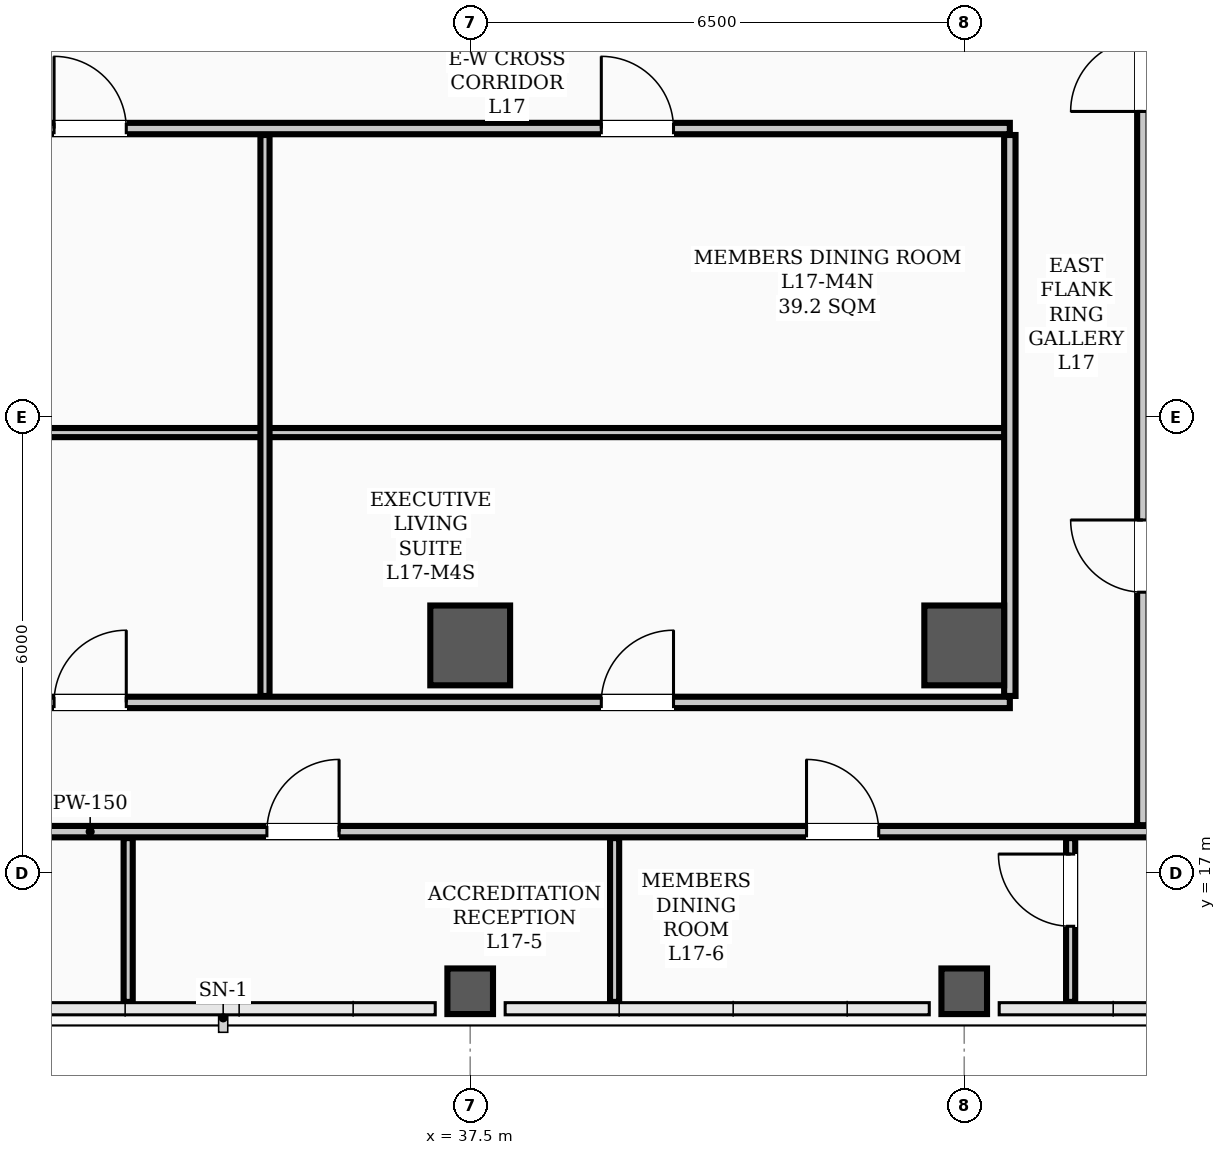
"""IFC4 building model, lengths in metres.
Left out: names, types, materials, properties, quantities, classifications, styles, units other than length and angle.
Written with IfcOpenShell. Run it as: python <this file> out.ifc"""

import sys

from ifc_helpers import new_model, si_unit, direction, frame, frame_2d, origin, origin_2d, place, context, subcontext, project, spatial, rectangle, hollow_rectangle, extrude, element, fill, save


model = new_model("IFC4")
c1 = context("Model", 3, precision=1e-05, world=origin(), true_north=direction((0.0, 1.0)))
c2 = subcontext(c1, "Body", "Model", "MODEL_VIEW")
j1 = project(units=[si_unit("LENGTHUNIT", "METRE"), si_unit("PLANEANGLEUNIT", "RADIAN")], contexts=[c1])
p1 = place(None, origin())
s1 = spatial("IfcSite", under=j1, at=p1, CompositionType="ELEMENT")
p2 = place(p1, origin())
s2 = spatial("IfcBuilding", under=s1, at=p2, CompositionType="ELEMENT")
p3 = place(p2, frame((0.0, 0.0, 69.4)))
s3 = spatial("IfcBuildingStorey", under=s2, at=p3, CompositionType="ELEMENT", Elevation=69.4)
for number, where, z_axis, x_axis in (
    (1, (37.5, 20.0, 0.0), (0.0, 0.0, 1.0), (1.0, 0.0, 0.0)),
    (2, (44.0, 20.0, 0.0), (0.0, 0.0, 1.0), (1.0, 0.0, 0.0)),
):
    element("IfcColumn", number, at=place(p3, frame(where, z_axis=z_axis, x_axis=x_axis)), inside=s3, PredefinedType="COLUMN", context=c2, shape_type="SweptSolid", body=[
        extrude(hollow_rectangle(XDim=1.05, YDim=1.05, WallThickness=0.038, InnerFilletRadius=0.019, OuterFilletRadius=0.057, at=origin_2d()), origin(), (0.0, 0.0, 1.0), 3.9),
    ])
for number, where, z_axis, x_axis in (
    (3, (37.5, 15.45, 0.0), (0.0, 0.0, 1.0), (1.0, 0.0, 0.0)),
    (4, (44.0, 15.45, 0.0), (0.0, 0.0, 1.0), (1.0, 0.0, 0.0)),
):
    element("IfcColumn", number, at=place(p3, frame(where, z_axis=z_axis, x_axis=x_axis)), inside=s3, PredefinedType="COLUMN", context=c2, shape_type="SweptSolid", body=[
        extrude(hollow_rectangle(XDim=0.6, YDim=0.6, WallThickness=0.026, InnerFilletRadius=0.013, OuterFilletRadius=0.039, at=origin_2d()), origin(), (0.0, 0.0, 1.0), 3.9),
    ])
p4 = place(p3, frame((12.9, 26.8, 0.0), z_axis=(0.0, 0.0, 1.0), x_axis=(1.0, 0.0, 0.0)))
e5 = element("IfcWall", 5, at=p4, inside=s3, PredefinedType="PARTITIONING", context=c2, shape_type="SweptSolid", body=[
    extrude(rectangle(XDim=31.7, YDim=0.15, at=frame_2d((15.85, 0.0))), origin(), (0.0, 0.0, 1.0), 3.1),
])
p5 = place(p4, frame((13.6, 0.0, 0.0)))
e6 = element("IfcOpeningElement", 6, at=p5, cuts=e5, PredefinedType="OPENING", context=c2, shape_type="SweptSolid", body=[
    extrude(rectangle(XDim=1.6, YDim=2.08, at=frame_2d((0.8, 1.04))), frame((0.0, 0.085, 0.0), z_axis=(0.0, -1.0, 0.0), x_axis=(1.0, 0.0, 0.0)), (0.0, 0.0, 1.0), 0.17),
])
p6 = place(p4, frame((2.475, 0.0, 0.0)))
e7 = element("IfcOpeningElement", 7, at=p6, cuts=e5, PredefinedType="OPENING", context=c2, shape_type="SweptSolid", body=[
    extrude(rectangle(XDim=0.95, YDim=2.08, at=frame_2d((0.475, 1.04))), frame((0.0, 0.085, 0.0), z_axis=(0.0, -1.0, 0.0), x_axis=(1.0, 0.0, 0.0)), (0.0, 0.0, 1.0), 0.17),
])
p7 = place(p4, frame((9.125, 0.0, 0.0)))
e8 = element("IfcOpeningElement", 8, at=p7, cuts=e5, PredefinedType="OPENING", context=c2, shape_type="SweptSolid", body=[
    extrude(rectangle(XDim=0.95, YDim=2.08, at=frame_2d((0.475, 1.04))), frame((0.0, 0.085, 0.0), z_axis=(0.0, -1.0, 0.0), x_axis=(1.0, 0.0, 0.0)), (0.0, 0.0, 1.0), 0.17),
])
p8 = place(p4, frame((19.125, 0.0, 0.0)))
e9 = element("IfcOpeningElement", 9, at=p8, cuts=e5, PredefinedType="OPENING", context=c2, shape_type="SweptSolid", body=[
    extrude(rectangle(XDim=0.95, YDim=2.08, at=frame_2d((0.475, 1.04))), frame((0.0, 0.085, 0.0), z_axis=(0.0, -1.0, 0.0), x_axis=(1.0, 0.0, 0.0)), (0.0, 0.0, 1.0), 0.17),
])
p9 = place(p4, frame((26.325, 0.0, 0.0)))
e10 = element("IfcOpeningElement", 10, at=p9, cuts=e5, PredefinedType="OPENING", context=c2, shape_type="SweptSolid", body=[
    extrude(rectangle(XDim=0.95, YDim=2.08, at=frame_2d((0.475, 1.04))), frame((0.0, 0.085, 0.0), z_axis=(0.0, -1.0, 0.0), x_axis=(1.0, 0.0, 0.0)), (0.0, 0.0, 1.0), 0.17),
])
p10 = place(p3, frame((10.16, 17.55, 0.0), z_axis=(0.0, 0.0, 1.0), x_axis=(1.0, 0.0, 0.0)))
e11 = element("IfcWall", 11, at=p10, inside=s3, PredefinedType="PARTITIONING", context=c2, shape_type="SweptSolid", body=[
    extrude(rectangle(XDim=44.68, YDim=0.15, at=frame_2d((22.34, 0.0))), origin(), (0.0, 0.0, 1.0), 3.1),
])
p11 = place(p10, frame((2.04, 0.0, 0.0)))
e12 = element("IfcOpeningElement", 12, at=p11, cuts=e11, PredefinedType="OPENING", context=c2, shape_type="SweptSolid", body=[
    extrude(rectangle(XDim=0.95, YDim=2.08, at=frame_2d((0.475, 1.04))), frame((0.0, 0.085, 0.0), z_axis=(0.0, -1.0, 0.0), x_axis=(1.0, 0.0, 0.0)), (0.0, 0.0, 1.0), 0.17),
])
p12 = place(p10, frame((6.565, 0.0, 0.0)))
e13 = element("IfcOpeningElement", 13, at=p12, cuts=e11, PredefinedType="OPENING", context=c2, shape_type="SweptSolid", body=[
    extrude(rectangle(XDim=0.95, YDim=2.08, at=frame_2d((0.475, 1.04))), frame((0.0, 0.085, 0.0), z_axis=(0.0, -1.0, 0.0), x_axis=(1.0, 0.0, 0.0)), (0.0, 0.0, 1.0), 0.17),
])
p13 = place(p10, frame((11.865, 0.0, 0.0)))
e14 = element("IfcOpeningElement", 14, at=p13, cuts=e11, PredefinedType="OPENING", context=c2, shape_type="SweptSolid", body=[
    extrude(rectangle(XDim=0.95, YDim=2.08, at=frame_2d((0.475, 1.04))), frame((0.0, 0.085, 0.0), z_axis=(0.0, -1.0, 0.0), x_axis=(1.0, 0.0, 0.0)), (0.0, 0.0, 1.0), 0.17),
])
p14 = place(p10, frame((24.665, 0.0, 0.0)))
e15 = element("IfcOpeningElement", 15, at=p14, cuts=e11, PredefinedType="OPENING", context=c2, shape_type="SweptSolid", body=[
    extrude(rectangle(XDim=0.95, YDim=2.08, at=frame_2d((0.475, 1.04))), frame((0.0, 0.085, 0.0), z_axis=(0.0, -1.0, 0.0), x_axis=(1.0, 0.0, 0.0)), (0.0, 0.0, 1.0), 0.17),
])
p15 = place(p10, frame((31.765, 0.0, 0.0)))
e16 = element("IfcOpeningElement", 16, at=p15, cuts=e11, PredefinedType="OPENING", context=c2, shape_type="SweptSolid", body=[
    extrude(rectangle(XDim=0.95, YDim=2.08, at=frame_2d((0.475, 1.04))), frame((0.0, 0.085, 0.0), z_axis=(0.0, -1.0, 0.0), x_axis=(1.0, 0.0, 0.0)), (0.0, 0.0, 1.0), 0.17),
])
p16 = place(p3, frame((28.4, 19.25, 0.0), z_axis=(0.0, 0.0, 1.0), x_axis=(1.0, 0.0, 0.0)))
e17 = element("IfcWall", 17, at=p16, inside=s3, PredefinedType="PARTITIONING", context=c2, shape_type="SweptSolid", body=[
    extrude(rectangle(XDim=16.2, YDim=0.15, at=frame_2d((8.1, 0.0))), origin(), (0.0, 0.0, 1.0), 3.1),
])
p17 = place(p16, frame((3.625, 0.0, 0.0)))
e18 = element("IfcOpeningElement", 18, at=p17, cuts=e17, PredefinedType="OPENING", context=c2, shape_type="SweptSolid", body=[
    extrude(rectangle(XDim=0.95, YDim=2.08, at=frame_2d((0.475, 1.04))), frame((0.0, 0.085, 0.0), z_axis=(0.0, -1.0, 0.0), x_axis=(1.0, 0.0, 0.0)), (0.0, 0.0, 1.0), 0.17),
])
p18 = place(p16, frame((10.825, 0.0, 0.0)))
e19 = element("IfcOpeningElement", 19, at=p18, cuts=e17, PredefinedType="OPENING", context=c2, shape_type="SweptSolid", body=[
    extrude(rectangle(XDim=0.95, YDim=2.08, at=frame_2d((0.475, 1.04))), frame((0.0, 0.085, 0.0), z_axis=(0.0, -1.0, 0.0), x_axis=(1.0, 0.0, 0.0)), (0.0, 0.0, 1.0), 0.17),
])
p19 = place(p3, frame((28.4, 22.8, 0.0), z_axis=(0.0, 0.0, 1.0), x_axis=(1.0, 0.0, 0.0)))
e20 = element("IfcWall", 20, at=p19, inside=s3, PredefinedType="PARTITIONING", context=c2, shape_type="SweptSolid", body=[
    extrude(rectangle(XDim=6.4, YDim=0.12, at=frame_2d((3.2, 0.0))), origin(), (0.0, 0.0, 1.0), 3.1),
])
p20 = place(p3, frame((34.8, 22.8, 0.0), z_axis=(0.0, 0.0, 1.0), x_axis=(1.0, 0.0, 0.0)))
e21 = element("IfcWall", 21, at=p20, inside=s3, PredefinedType="PARTITIONING", context=c2, shape_type="SweptSolid", body=[
    extrude(rectangle(XDim=9.8, YDim=0.12, at=frame_2d((4.9, 0.0))), origin(), (0.0, 0.0, 1.0), 3.1),
])
p21 = place(p3, frame((46.35, 24.8, 0.0), z_axis=(0.0, 0.0, 1.0), x_axis=(1.0, 0.0, 0.0)))
e22 = element("IfcWall", 22, at=p21, inside=s3, PredefinedType="PARTITIONING", context=c2, shape_type="SweptSolid", body=[
    extrude(rectangle(XDim=10.84, YDim=0.12, at=frame_2d((5.42, 0.0))), origin(), (0.0, 0.0, 1.0), 3.212),
])
p22 = place(p3, frame((46.35, 17.635, 0.0), z_axis=(0.0, 0.0, 1.0), x_axis=(0.0, 1.0, 0.0)))
e23 = element("IfcWall", 23, at=p22, inside=s3, PredefinedType="PARTITIONING", context=c2, shape_type="SweptSolid", body=[
    extrude(rectangle(XDim=22.53, YDim=0.15, at=frame_2d((11.265, 0.0))), origin(), (0.0, 0.0, 1.0), 3.0),
])
p23 = place(p22, frame((3.065, 0.0, 0.0)))
e24 = element("IfcOpeningElement", 24, at=p23, cuts=e23, PredefinedType="OPENING", context=c2, shape_type="SweptSolid", body=[
    extrude(rectangle(XDim=0.95, YDim=2.08, at=frame_2d((0.475, 1.04))), frame((0.0, 0.085, 0.0), z_axis=(0.0, -1.0, 0.0), x_axis=(1.0, 0.0, 0.0)), (0.0, 0.0, 1.0), 0.17),
])
p24 = place(p22, frame((9.39, 0.0, 0.0)))
e25 = element("IfcOpeningElement", 25, at=p24, cuts=e23, PredefinedType="OPENING", context=c2, shape_type="SweptSolid", body=[
    extrude(rectangle(XDim=0.95, YDim=2.08, at=frame_2d((0.475, 1.04))), frame((0.0, 0.085, 0.0), z_axis=(0.0, -1.0, 0.0), x_axis=(1.0, 0.0, 0.0)), (0.0, 0.0, 1.0), 0.17),
])
p25 = place(p22, frame((14.69, 0.0, 0.0)))
e26 = element("IfcOpeningElement", 26, at=p25, cuts=e23, PredefinedType="OPENING", context=c2, shape_type="SweptSolid", body=[
    extrude(rectangle(XDim=0.95, YDim=2.08, at=frame_2d((0.475, 1.04))), frame((0.0, 0.085, 0.0), z_axis=(0.0, -1.0, 0.0), x_axis=(1.0, 0.0, 0.0)), (0.0, 0.0, 1.0), 0.17),
])
p26 = place(p22, frame((19.715, 0.0, 0.0)))
e27 = element("IfcOpeningElement", 27, at=p26, cuts=e23, PredefinedType="OPENING", context=c2, shape_type="SweptSolid", body=[
    extrude(rectangle(XDim=0.95, YDim=2.08, at=frame_2d((0.475, 1.04))), frame((0.0, 0.085, 0.0), z_axis=(0.0, -1.0, 0.0), x_axis=(1.0, 0.0, 0.0)), (0.0, 0.0, 1.0), 0.17),
])
p27 = place(p3, frame((44.6, 19.335, 0.0), z_axis=(0.0, 0.0, 1.0), x_axis=(0.0, 1.0, 0.0)))
e28 = element("IfcWall", 28, at=p27, inside=s3, PredefinedType="PARTITIONING", context=c2, shape_type="SweptSolid", body=[
    extrude(rectangle(XDim=7.38, YDim=0.15, at=frame_2d((3.69, 0.0))), origin(), (0.0, 0.0, 1.0), 3.0),
])
for number, where, z_axis, x_axis in (
    (29, (33.0, 15.31, 0.0), (0.0, 0.0, 1.0), (0.0, 1.0, 0.0)),
    (30, (39.4, 15.31, 0.0), (0.0, 0.0, 1.0), (0.0, 1.0, 0.0)),
):
    element("IfcWall", number, at=place(p3, frame(where, z_axis=z_axis, x_axis=x_axis)), inside=s3, PredefinedType="PARTITIONING", context=c2, shape_type="SweptSolid", body=[
        extrude(rectangle(XDim=2.155, YDim=0.12, at=frame_2d((1.078, 0.0))), origin(), (0.0, 0.0, 1.0), 3.212),
    ])
p28 = place(p3, frame((45.4, 15.31, 0.0), z_axis=(0.0, 0.0, 1.0), x_axis=(0.0, 1.0, 0.0)))
e31 = element("IfcWall", 31, at=p28, inside=s3, PredefinedType="PARTITIONING", context=c2, shape_type="SweptSolid", body=[
    extrude(rectangle(XDim=2.155, YDim=0.12, at=frame_2d((1.078, 0.0))), origin(), (0.0, 0.0, 1.0), 3.72),
])
p29 = place(p28, frame((0.995, 0.0, 0.0)))
e32 = element("IfcOpeningElement", 32, at=p29, cuts=e31, PredefinedType="OPENING", context=c2, shape_type="SweptSolid", body=[
    extrude(rectangle(XDim=0.95, YDim=2.08, at=frame_2d((0.475, 1.04))), frame((0.0, 0.07, 0.0), z_axis=(0.0, -1.0, 0.0), x_axis=(1.0, 0.0, 0.0)), (0.0, 0.0, 1.0), 0.14),
])
p30 = place(p3, frame((34.8, 19.335, 0.0), z_axis=(0.0, 0.0, 1.0), x_axis=(0.0, 1.0, 0.0)))
e33 = element("IfcWall", 33, at=p30, inside=s3, PredefinedType="PARTITIONING", context=c2, shape_type="SweptSolid", body=[
    extrude(rectangle(XDim=7.38, YDim=0.12, at=frame_2d((3.69, 0.0))), origin(), (0.0, 0.0, 1.0), 3.0),
])
p31 = place(p14, origin())
e34 = element("IfcDoor", 34, at=p31, inside=s3, OperationType="SINGLE_SWING_RIGHT", PredefinedType="DOOR", context=c2, shape_type="SweptSolid", body=[
    extrude(rectangle(XDim=0.95, YDim=2.08, at=frame_2d((0.475, 1.04))), frame((0.0, 0.025, 0.0), z_axis=(0.0, -1.0, 0.0), x_axis=(1.0, 0.0, 0.0)), (0.0, 0.0, 1.0), 0.05),
])
fill(e15, e34)
p32 = place(p15, origin())
e35 = element("IfcDoor", 35, at=p32, inside=s3, OperationType="SINGLE_SWING_LEFT", PredefinedType="DOOR", context=c2, shape_type="SweptSolid", body=[
    extrude(rectangle(XDim=0.95, YDim=2.08, at=frame_2d((0.475, 1.04))), frame((0.0, 0.025, 0.0), z_axis=(0.0, -1.0, 0.0), x_axis=(1.0, 0.0, 0.0)), (0.0, 0.0, 1.0), 0.05),
])
fill(e16, e35)
p33 = place(p29, origin())
e36 = element("IfcDoor", 36, at=p33, inside=s3, OperationType="SINGLE_SWING_RIGHT", PredefinedType="DOOR", context=c2, shape_type="SweptSolid", body=[
    extrude(rectangle(XDim=0.95, YDim=2.08, at=frame_2d((0.475, 1.04))), frame((0.0, 0.025, 0.0), z_axis=(0.0, -1.0, 0.0), x_axis=(1.0, 0.0, 0.0)), (0.0, 0.0, 1.0), 0.05),
])
fill(e32, e36)
p34 = place(p8, origin())
e37 = element("IfcDoor", 37, at=p34, inside=s3, OperationType="SINGLE_SWING_LEFT", PredefinedType="DOOR", context=c2, shape_type="SweptSolid", body=[
    extrude(rectangle(XDim=0.95, YDim=2.08, at=frame_2d((0.475, 1.04))), frame((0.0, 0.025, 0.0), z_axis=(0.0, -1.0, 0.0), x_axis=(1.0, 0.0, 0.0)), (0.0, 0.0, 1.0), 0.05),
])
fill(e9, e37)
p35 = place(p17, origin())
e38 = element("IfcDoor", 38, at=p35, inside=s3, OperationType="SINGLE_SWING_RIGHT", PredefinedType="DOOR", context=c2, shape_type="SweptSolid", body=[
    extrude(rectangle(XDim=0.95, YDim=2.08, at=frame_2d((0.475, 1.04))), frame((0.0, 0.025, 0.0), z_axis=(0.0, -1.0, 0.0), x_axis=(1.0, 0.0, 0.0)), (0.0, 0.0, 1.0), 0.05),
])
fill(e18, e38)
p36 = place(p9, origin())
e39 = element("IfcDoor", 39, at=p36, inside=s3, OperationType="SINGLE_SWING_LEFT", PredefinedType="DOOR", context=c2, shape_type="SweptSolid", body=[
    extrude(rectangle(XDim=0.95, YDim=2.08, at=frame_2d((0.475, 1.04))), frame((0.0, 0.025, 0.0), z_axis=(0.0, -1.0, 0.0), x_axis=(1.0, 0.0, 0.0)), (0.0, 0.0, 1.0), 0.05),
])
fill(e10, e39)
p37 = place(p18, origin())
e40 = element("IfcDoor", 40, at=p37, inside=s3, OperationType="SINGLE_SWING_RIGHT", PredefinedType="DOOR", context=c2, shape_type="SweptSolid", body=[
    extrude(rectangle(XDim=0.95, YDim=2.08, at=frame_2d((0.475, 1.04))), frame((0.0, 0.025, 0.0), z_axis=(0.0, -1.0, 0.0), x_axis=(1.0, 0.0, 0.0)), (0.0, 0.0, 1.0), 0.05),
])
fill(e19, e40)
p38 = place(p23, origin())
e41 = element("IfcDoor", 41, at=p38, inside=s3, OperationType="SINGLE_SWING_RIGHT", PredefinedType="DOOR", context=c2, shape_type="SweptSolid", body=[
    extrude(rectangle(XDim=0.95, YDim=2.08, at=frame_2d((0.475, 1.04))), frame((0.0, 0.025, 0.0), z_axis=(0.0, -1.0, 0.0), x_axis=(1.0, 0.0, 0.0)), (0.0, 0.0, 1.0), 0.05),
])
fill(e24, e41)
p39 = place(p24, origin())
e42 = element("IfcDoor", 42, at=p39, inside=s3, OperationType="SINGLE_SWING_LEFT", PredefinedType="DOOR", context=c2, shape_type="SweptSolid", body=[
    extrude(rectangle(XDim=0.95, YDim=2.08, at=frame_2d((0.475, 1.04))), frame((0.0, 0.025, 0.0), z_axis=(0.0, -1.0, 0.0), x_axis=(1.0, 0.0, 0.0)), (0.0, 0.0, 1.0), 0.05),
])
fill(e25, e42)
save(model, sys.argv[1])
